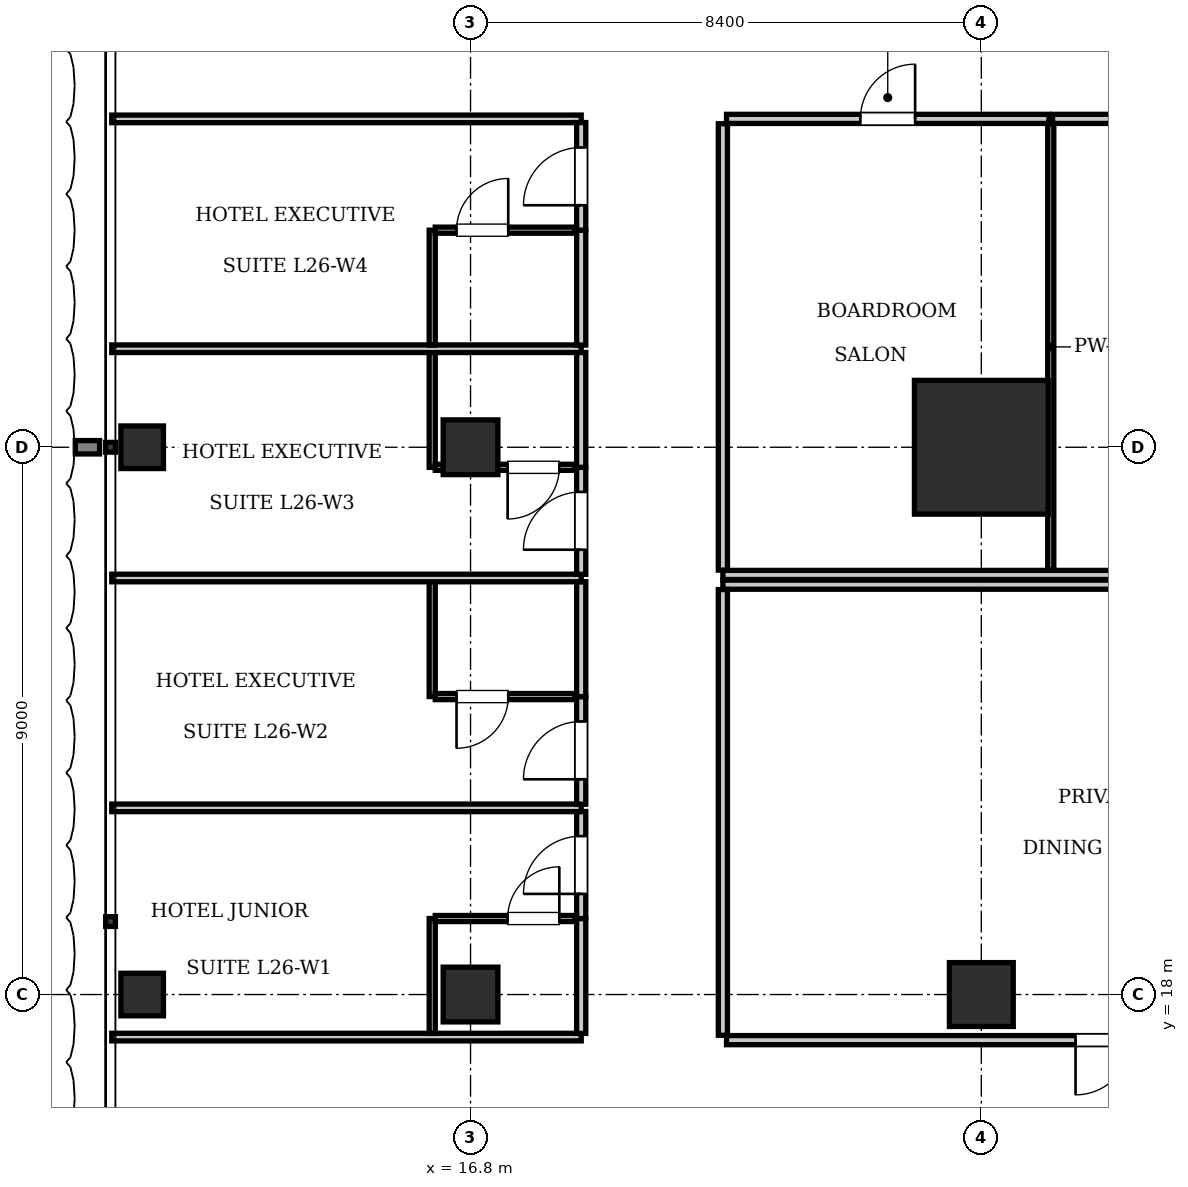
"""IFC4 building model, lengths in metres.
Left out: names, types, materials, properties, quantities, classifications, styles, units other than length and angle.
Written with IfcOpenShell. Run it as: python <this file> out.ifc"""

import sys

from ifc_helpers import new_model, si_unit, direction, frame, frame_2d, origin, origin_2d, place, context, subcontext, project, spatial, rectangle, i_section, extrude, element, fill, save


model = new_model("IFC4")
c1 = context("Model", 3, precision=1e-05, world=origin(), true_north=direction((0.0, 1.0)))
c2 = subcontext(c1, "Body", "Model", "MODEL_VIEW")
j1 = project(units=[si_unit("LENGTHUNIT", "METRE"), si_unit("PLANEANGLEUNIT", "RADIAN")], contexts=[c1])
p1 = place(None, origin())
s1 = spatial("IfcSite", under=j1, at=p1, CompositionType="ELEMENT")
p2 = place(p1, origin())
s2 = spatial("IfcBuilding", under=s1, at=p2, CompositionType="ELEMENT")
p3 = place(p2, frame((0.0, 0.0, 107.8)))
s3 = spatial("IfcBuildingStorey", under=s2, at=p3, CompositionType="ELEMENT", Elevation=107.8)
p4 = place(p3, frame((25.2, 27.0, 0.0), z_axis=(0.0, 0.0, 1.0), x_axis=(1.0, 0.0, 0.0)))
e1 = element("IfcColumn", 1, at=p4, inside=s3, PredefinedType="COLUMN", context=c2, shape_type="SweptSolid", body=[
    extrude(rectangle(XDim=2.2, YDim=2.2, at=origin_2d()), origin(), (0.0, 0.0, 1.0), 3.85),
])
p5 = place(p3, frame((25.2, 18.0, 0.0), z_axis=(0.0, 0.0, 1.0), x_axis=(1.0, 0.0, 0.0)))
e2 = element("IfcColumn", 2, at=p5, inside=s3, PredefinedType="COLUMN", context=c2, shape_type="SweptSolid", body=[
    extrude(rectangle(XDim=1.05, YDim=1.05, at=origin_2d()), origin(), (0.0, 0.0, 1.0), 3.85),
])
for number, where, z_axis, x_axis in (
    (3, (16.8, 18.0, 0.0), (0.0, 0.0, 1.0), (1.0, 0.0, 0.0)),
    (4, (16.8, 27.0, 0.0), (0.0, 0.0, 1.0), (1.0, 0.0, 0.0)),
):
    element("IfcColumn", number, at=place(p3, frame(where, z_axis=z_axis, x_axis=x_axis)), inside=s3, PredefinedType="COLUMN", context=c2, shape_type="SweptSolid", body=[
        extrude(rectangle(XDim=0.9, YDim=0.9, at=origin_2d()), origin(), (0.0, 0.0, 1.0), 3.85),
    ])
for number, where, z_axis, x_axis in (
    (5, (11.4, 18.0, 0.0), (0.0, 0.0, 1.0), (1.0, 0.0, 0.0)),
    (6, (11.4, 27.0, 0.0), (0.0, 0.0, 1.0), (1.0, 0.0, 0.0)),
):
    element("IfcColumn", number, at=place(p3, frame(where, z_axis=z_axis, x_axis=x_axis)), inside=s3, PredefinedType="COLUMN", context=c2, shape_type="SweptSolid", body=[
        extrude(i_section(OverallWidth=0.7, OverallDepth=0.7, WebThickness=0.028, FlangeThickness=0.044, at=origin_2d()), origin(), (0.0, 0.0, 1.0), 3.85),
    ])
p6 = place(p3, frame((20.95, 24.9, 0.0), z_axis=(0.0, 0.0, 1.0), x_axis=(1.0, 0.0, 0.0)))
e7 = element("IfcWall", 7, at=p6, inside=s3, PredefinedType="PARTITIONING", context=c2, shape_type="SweptSolid", body=[
    extrude(rectangle(XDim=33.7, YDim=0.15, at=frame_2d((16.85, 0.0))), origin(), (0.0, 0.0, 1.0), 3.61),
])
p7 = place(p3, frame((20.95, 24.98, 0.0), z_axis=(0.0, 0.0, 1.0), x_axis=(0.0, 1.0, 0.0)))
e8 = element("IfcWall", 8, at=p7, inside=s3, PredefinedType="PARTITIONING", context=c2, shape_type="SweptSolid", body=[
    extrude(rectangle(XDim=7.34, YDim=0.15, at=frame_2d((3.67, 0.0))), origin(), (0.0, 0.0, 1.0), 3.293),
])
p8 = place(p3, frame((21.01, 32.4, 0.0), z_axis=(0.0, 0.0, 1.0), x_axis=(1.0, 0.0, 0.0)))
e9 = element("IfcWall", 9, at=p8, inside=s3, PredefinedType="PARTITIONING", context=c2, shape_type="SweptSolid", body=[
    extrude(rectangle(XDim=5.302, YDim=0.15, at=frame_2d((2.651, 0.0))), origin(), (0.0, 0.0, 1.0), 3.61),
])
p9 = place(p8, frame((2.201, 0.0, 0.0)))
e10 = element("IfcOpeningElement", 10, at=p9, cuts=e9, PredefinedType="OPENING", context=c2, shape_type="SweptSolid", body=[
    extrude(rectangle(XDim=0.9, YDim=2.1, at=frame_2d((0.45, 1.05))), frame((0.0, 0.085, 0.0), z_axis=(0.0, -1.0, 0.0), x_axis=(1.0, 0.0, 0.0)), (0.0, 0.0, 1.0), 0.17),
])
p10 = place(p3, frame((26.342, 24.98, 0.0), z_axis=(0.0, 0.0, 1.0), x_axis=(0.0, 1.0, 0.0)))
e11 = element("IfcWall", 11, at=p10, inside=s3, PredefinedType="PARTITIONING", context=c2, shape_type="SweptSolid", body=[
    extrude(rectangle(XDim=7.34, YDim=0.1, at=frame_2d((3.67, 0.0))), origin(), (0.0, 0.0, 1.0), 3.61),
])
p11 = place(p3, frame((26.372, 32.4, 0.0), z_axis=(0.0, 0.0, 1.0), x_axis=(1.0, 0.0, 0.0)))
e12 = element("IfcWall", 12, at=p11, inside=s3, PredefinedType="PARTITIONING", context=c2, shape_type="SweptSolid", body=[
    extrude(rectangle(XDim=7.354, YDim=0.15, at=frame_2d((3.677, 0.0))), origin(), (0.0, 0.0, 1.0), 3.61),
])
p12 = place(p11, frame((3.227, 0.0, 0.0)))
e13 = element("IfcOpeningElement", 13, at=p12, cuts=e12, PredefinedType="OPENING", context=c2, shape_type="SweptSolid", body=[
    extrude(rectangle(XDim=0.9, YDim=2.1, at=frame_2d((0.45, 1.05))), frame((0.0, 0.085, 0.0), z_axis=(0.0, -1.0, 0.0), x_axis=(1.0, 0.0, 0.0)), (0.0, 0.0, 1.0), 0.17),
])
p13 = place(p3, frame((20.95, 24.74, 0.0), z_axis=(0.0, 0.0, 1.0), x_axis=(1.0, 0.0, 0.0)))
e14 = element("IfcWall", 14, at=p13, inside=s3, PredefinedType="PARTITIONING", context=c2, shape_type="SweptSolid", body=[
    extrude(rectangle(XDim=33.7, YDim=0.15, at=frame_2d((16.85, 0.0))), origin(), (0.0, 0.0, 1.0), 3.61),
])
p14 = place(p3, frame((20.95, 17.33, 0.0), z_axis=(0.0, 0.0, 1.0), x_axis=(0.0, 1.0, 0.0)))
e15 = element("IfcWall", 15, at=p14, inside=s3, PredefinedType="PARTITIONING", context=c2, shape_type="SweptSolid", body=[
    extrude(rectangle(XDim=7.33, YDim=0.15, at=frame_2d((3.665, 0.0))), origin(), (0.0, 0.0, 1.0), 3.293),
])
p15 = place(p3, frame((21.01, 17.25, 0.0), z_axis=(0.0, 0.0, 1.0), x_axis=(1.0, 0.0, 0.0)))
e16 = element("IfcWall", 16, at=p15, inside=s3, PredefinedType="PARTITIONING", context=c2, shape_type="SweptSolid", body=[
    extrude(rectangle(XDim=12.379, YDim=0.15, at=frame_2d((6.189, 0.0))), origin(), (0.0, 0.0, 1.0), 3.61),
])
p16 = place(p15, frame((5.74, 0.0, 0.0)))
e17 = element("IfcOpeningElement", 17, at=p16, cuts=e16, PredefinedType="OPENING", context=c2, shape_type="SweptSolid", body=[
    extrude(rectangle(XDim=0.9, YDim=2.1, at=frame_2d((0.45, 1.05))), frame((0.0, 0.085, 0.0), z_axis=(0.0, -1.0, 0.0), x_axis=(1.0, 0.0, 0.0)), (0.0, 0.0, 1.0), 0.17),
])
for number, where, z_axis, x_axis in (
    (18, (10.9, 17.3, 0.0), (0.0, 0.0, 1.0), (1.0, 0.0, 0.0)),
    (19, (10.9, 32.4, 0.0), (0.0, 0.0, 1.0), (1.0, 0.0, 0.0)),
):
    element("IfcWall", number, at=place(p3, frame(where, z_axis=z_axis, x_axis=x_axis)), inside=s3, PredefinedType="PARTITIONING", context=c2, shape_type="SweptSolid", body=[
        extrude(rectangle(XDim=7.72, YDim=0.125, at=frame_2d((3.86, 0.0))), origin(), (0.0, 0.0, 1.0), 3.61),
    ])
p17 = place(p3, frame((18.62, 17.36, 0.0), z_axis=(0.0, 0.0, 1.0), x_axis=(0.0, 1.0, 0.0)))
e20 = element("IfcWall", 20, at=p17, inside=s3, PredefinedType="PARTITIONING", context=c2, shape_type="SweptSolid", body=[
    extrude(rectangle(XDim=1.89, YDim=0.15, at=frame_2d((0.945, 0.0))), origin(), (0.0, 0.0, 1.0), 3.61),
])
p18 = place(p3, frame((18.62, 19.25, 0.0), z_axis=(0.0, 0.0, 1.0), x_axis=(0.0, 1.0, 0.0)))
e21 = element("IfcWall", 21, at=p18, inside=s3, PredefinedType="PARTITIONING", context=c2, shape_type="SweptSolid", body=[
    extrude(rectangle(XDim=1.76, YDim=0.15, at=frame_2d((0.88, 0.0))), origin(), (0.0, 0.0, 1.0), 3.61),
])
p19 = place(p18, frame((0.405, 0.0, 0.0)))
e22 = element("IfcOpeningElement", 22, at=p19, cuts=e21, PredefinedType="OPENING", context=c2, shape_type="SweptSolid", body=[
    extrude(rectangle(XDim=0.95, YDim=2.15, at=frame_2d((0.475, 1.075))), frame((0.0, 0.085, 0.0), z_axis=(0.0, -1.0, 0.0), x_axis=(1.0, 0.0, 0.0)), (0.0, 0.0, 1.0), 0.17),
])
p20 = place(p3, frame((16.17, 17.36, 0.0), z_axis=(0.0, 0.0, 1.0), x_axis=(0.0, 1.0, 0.0)))
e23 = element("IfcWall", 23, at=p20, inside=s3, PredefinedType="PARTITIONING", context=c2, shape_type="SweptSolid", body=[
    extrude(rectangle(XDim=1.89, YDim=0.1, at=frame_2d((0.945, 0.0))), origin(), (0.0, 0.0, 1.0), 3.61),
])
p21 = place(p3, frame((16.22, 19.25, 0.0), z_axis=(0.0, 0.0, 1.0), x_axis=(1.0, 0.0, 0.0)))
e24 = element("IfcWall", 24, at=p21, inside=s3, PredefinedType="PARTITIONING", context=c2, shape_type="SweptSolid", body=[
    extrude(rectangle(XDim=2.3, YDim=0.1, at=frame_2d((1.15, 0.0))), origin(), (0.0, 0.0, 1.0), 3.61),
])
p22 = place(p21, frame((1.19, 0.0, 0.0)))
e25 = element("IfcOpeningElement", 25, at=p22, cuts=e24, PredefinedType="OPENING", context=c2, shape_type="SweptSolid", body=[
    extrude(rectangle(XDim=0.85, YDim=2.1, at=frame_2d((0.425, 1.05))), frame((0.0, 0.06, 0.0), z_axis=(0.0, -1.0, 0.0), x_axis=(1.0, 0.0, 0.0)), (0.0, 0.0, 1.0), 0.12),
])
p23 = place(p3, frame((10.9, 21.07, 0.0), z_axis=(0.0, 0.0, 1.0), x_axis=(1.0, 0.0, 0.0)))
e26 = element("IfcWall", 26, at=p23, inside=s3, PredefinedType="PARTITIONING", context=c2, shape_type="SweptSolid", body=[
    extrude(rectangle(XDim=7.72, YDim=0.125, at=frame_2d((3.86, 0.0))), origin(), (0.0, 0.0, 1.0), 3.61),
])
p24 = place(p3, frame((18.62, 21.13, 0.0), z_axis=(0.0, 0.0, 1.0), x_axis=(0.0, 1.0, 0.0)))
e27 = element("IfcWall", 27, at=p24, inside=s3, PredefinedType="PARTITIONING", context=c2, shape_type="SweptSolid", body=[
    extrude(rectangle(XDim=1.77, YDim=0.15, at=frame_2d((0.885, 0.0))), origin(), (0.0, 0.0, 1.0), 3.61),
])
p25 = place(p24, frame((0.41, 0.0, 0.0)))
e28 = element("IfcOpeningElement", 28, at=p25, cuts=e27, PredefinedType="OPENING", context=c2, shape_type="SweptSolid", body=[
    extrude(rectangle(XDim=0.95, YDim=2.15, at=frame_2d((0.475, 1.075))), frame((0.0, 0.085, 0.0), z_axis=(0.0, -1.0, 0.0), x_axis=(1.0, 0.0, 0.0)), (0.0, 0.0, 1.0), 0.17),
])
p26 = place(p3, frame((18.62, 22.9, 0.0), z_axis=(0.0, 0.0, 1.0), x_axis=(0.0, 1.0, 0.0)))
e29 = element("IfcWall", 29, at=p26, inside=s3, PredefinedType="PARTITIONING", context=c2, shape_type="SweptSolid", body=[
    extrude(rectangle(XDim=1.89, YDim=0.15, at=frame_2d((0.945, 0.0))), origin(), (0.0, 0.0, 1.0), 3.61),
])
p27 = place(p3, frame((16.17, 22.9, 0.0), z_axis=(0.0, 0.0, 1.0), x_axis=(0.0, 1.0, 0.0)))
e30 = element("IfcWall", 30, at=p27, inside=s3, PredefinedType="PARTITIONING", context=c2, shape_type="SweptSolid", body=[
    extrude(rectangle(XDim=1.89, YDim=0.1, at=frame_2d((0.945, 0.0))), origin(), (0.0, 0.0, 1.0), 3.61),
])
p28 = place(p3, frame((16.22, 22.9, 0.0), z_axis=(0.0, 0.0, 1.0), x_axis=(1.0, 0.0, 0.0)))
e31 = element("IfcWall", 31, at=p28, inside=s3, PredefinedType="PARTITIONING", context=c2, shape_type="SweptSolid", body=[
    extrude(rectangle(XDim=2.3, YDim=0.1, at=frame_2d((1.15, 0.0))), origin(), (0.0, 0.0, 1.0), 3.61),
])
p29 = place(p28, frame((0.35, 0.0, 0.0)))
e32 = element("IfcOpeningElement", 32, at=p29, cuts=e31, PredefinedType="OPENING", context=c2, shape_type="SweptSolid", body=[
    extrude(rectangle(XDim=0.85, YDim=2.1, at=frame_2d((0.425, 1.05))), frame((0.0, 0.06, 0.0), z_axis=(0.0, -1.0, 0.0), x_axis=(1.0, 0.0, 0.0)), (0.0, 0.0, 1.0), 0.12),
])
p30 = place(p3, frame((10.9, 24.85, 0.0), z_axis=(0.0, 0.0, 1.0), x_axis=(1.0, 0.0, 0.0)))
e33 = element("IfcWall", 33, at=p30, inside=s3, PredefinedType="PARTITIONING", context=c2, shape_type="SweptSolid", body=[
    extrude(rectangle(XDim=7.72, YDim=0.125, at=frame_2d((3.86, 0.0))), origin(), (0.0, 0.0, 1.0), 3.61),
])
p31 = place(p3, frame((18.62, 24.91, 0.0), z_axis=(0.0, 0.0, 1.0), x_axis=(0.0, 1.0, 0.0)))
e34 = element("IfcWall", 34, at=p31, inside=s3, PredefinedType="PARTITIONING", context=c2, shape_type="SweptSolid", body=[
    extrude(rectangle(XDim=1.76, YDim=0.15, at=frame_2d((0.88, 0.0))), origin(), (0.0, 0.0, 1.0), 3.61),
])
p32 = place(p31, frame((0.405, 0.0, 0.0)))
e35 = element("IfcOpeningElement", 35, at=p32, cuts=e34, PredefinedType="OPENING", context=c2, shape_type="SweptSolid", body=[
    extrude(rectangle(XDim=0.95, YDim=2.15, at=frame_2d((0.475, 1.075))), frame((0.0, 0.085, 0.0), z_axis=(0.0, -1.0, 0.0), x_axis=(1.0, 0.0, 0.0)), (0.0, 0.0, 1.0), 0.17),
])
p33 = place(p3, frame((18.62, 26.67, 0.0), z_axis=(0.0, 0.0, 1.0), x_axis=(0.0, 1.0, 0.0)))
e36 = element("IfcWall", 36, at=p33, inside=s3, PredefinedType="PARTITIONING", context=c2, shape_type="SweptSolid", body=[
    extrude(rectangle(XDim=1.89, YDim=0.15, at=frame_2d((0.945, 0.0))), origin(), (0.0, 0.0, 1.0), 3.61),
])
p34 = place(p3, frame((16.17, 26.67, 0.0), z_axis=(0.0, 0.0, 1.0), x_axis=(0.0, 1.0, 0.0)))
e37 = element("IfcWall", 37, at=p34, inside=s3, PredefinedType="PARTITIONING", context=c2, shape_type="SweptSolid", body=[
    extrude(rectangle(XDim=1.89, YDim=0.1, at=frame_2d((0.945, 0.0))), origin(), (0.0, 0.0, 1.0), 3.61),
])
p35 = place(p3, frame((16.22, 26.67, 0.0), z_axis=(0.0, 0.0, 1.0), x_axis=(1.0, 0.0, 0.0)))
e38 = element("IfcWall", 38, at=p35, inside=s3, PredefinedType="PARTITIONING", context=c2, shape_type="SweptSolid", body=[
    extrude(rectangle(XDim=2.3, YDim=0.1, at=frame_2d((1.15, 0.0))), origin(), (0.0, 0.0, 1.0), 3.61),
])
p36 = place(p35, frame((1.19, 0.0, 0.0)))
e39 = element("IfcOpeningElement", 39, at=p36, cuts=e38, PredefinedType="OPENING", context=c2, shape_type="SweptSolid", body=[
    extrude(rectangle(XDim=0.85, YDim=2.1, at=frame_2d((0.425, 1.05))), frame((0.0, 0.06, 0.0), z_axis=(0.0, -1.0, 0.0), x_axis=(1.0, 0.0, 0.0)), (0.0, 0.0, 1.0), 0.12),
])
p37 = place(p3, frame((10.9, 28.62, 0.0), z_axis=(0.0, 0.0, 1.0), x_axis=(1.0, 0.0, 0.0)))
e40 = element("IfcWall", 40, at=p37, inside=s3, PredefinedType="PARTITIONING", context=c2, shape_type="SweptSolid", body=[
    extrude(rectangle(XDim=7.72, YDim=0.125, at=frame_2d((3.86, 0.0))), origin(), (0.0, 0.0, 1.0), 3.61),
])
p38 = place(p3, frame((18.62, 28.68, 0.0), z_axis=(0.0, 0.0, 1.0), x_axis=(0.0, 1.0, 0.0)))
e41 = element("IfcWall", 41, at=p38, inside=s3, PredefinedType="PARTITIONING", context=c2, shape_type="SweptSolid", body=[
    extrude(rectangle(XDim=1.89, YDim=0.15, at=frame_2d((0.945, 0.0))), origin(), (0.0, 0.0, 1.0), 3.61),
])
p39 = place(p3, frame((18.62, 30.57, 0.0), z_axis=(0.0, 0.0, 1.0), x_axis=(0.0, 1.0, 0.0)))
e42 = element("IfcWall", 42, at=p39, inside=s3, PredefinedType="PARTITIONING", context=c2, shape_type="SweptSolid", body=[
    extrude(rectangle(XDim=1.77, YDim=0.15, at=frame_2d((0.885, 0.0))), origin(), (0.0, 0.0, 1.0), 3.61),
])
p40 = place(p39, frame((0.41, 0.0, 0.0)))
e43 = element("IfcOpeningElement", 43, at=p40, cuts=e42, PredefinedType="OPENING", context=c2, shape_type="SweptSolid", body=[
    extrude(rectangle(XDim=0.95, YDim=2.15, at=frame_2d((0.475, 1.075))), frame((0.0, 0.085, 0.0), z_axis=(0.0, -1.0, 0.0), x_axis=(1.0, 0.0, 0.0)), (0.0, 0.0, 1.0), 0.17),
])
p41 = place(p3, frame((16.17, 28.68, 0.0), z_axis=(0.0, 0.0, 1.0), x_axis=(0.0, 1.0, 0.0)))
e44 = element("IfcWall", 44, at=p41, inside=s3, PredefinedType="PARTITIONING", context=c2, shape_type="SweptSolid", body=[
    extrude(rectangle(XDim=1.89, YDim=0.1, at=frame_2d((0.945, 0.0))), origin(), (0.0, 0.0, 1.0), 3.61),
])
p42 = place(p3, frame((16.22, 30.57, 0.0), z_axis=(0.0, 0.0, 1.0), x_axis=(1.0, 0.0, 0.0)))
e45 = element("IfcWall", 45, at=p42, inside=s3, PredefinedType="PARTITIONING", context=c2, shape_type="SweptSolid", body=[
    extrude(rectangle(XDim=2.3, YDim=0.1, at=frame_2d((1.15, 0.0))), origin(), (0.0, 0.0, 1.0), 3.61),
])
p43 = place(p42, frame((0.35, 0.0, 0.0)))
e46 = element("IfcOpeningElement", 46, at=p43, cuts=e45, PredefinedType="OPENING", context=c2, shape_type="SweptSolid", body=[
    extrude(rectangle(XDim=0.85, YDim=2.1, at=frame_2d((0.425, 1.05))), frame((0.0, 0.06, 0.0), z_axis=(0.0, -1.0, 0.0), x_axis=(1.0, 0.0, 0.0)), (0.0, 0.0, 1.0), 0.12),
])
p44 = place(p9, origin())
e47 = element("IfcDoor", 47, at=p44, inside=s3, OperationType="SINGLE_SWING_RIGHT", PredefinedType="DOOR", context=c2, shape_type="SweptSolid", body=[
    extrude(rectangle(XDim=0.9, YDim=2.1, at=frame_2d((0.45, 1.05))), frame((0.0, 0.025, 0.0), z_axis=(0.0, -1.0, 0.0), x_axis=(1.0, 0.0, 0.0)), (0.0, 0.0, 1.0), 0.05),
])
fill(e10, e47)
p45 = place(p16, frame((0.9, 0.0, 0.0), z_axis=(0.0, 0.0, 1.0), x_axis=(-1.0, 0.0, 0.0)))
e48 = element("IfcDoor", 48, at=p45, inside=s3, OperationType="SINGLE_SWING_RIGHT", PredefinedType="DOOR", context=c2, shape_type="SweptSolid", body=[
    extrude(rectangle(XDim=0.9, YDim=2.1, at=frame_2d((0.45, 1.05))), frame((0.0, 0.025, 0.0), z_axis=(0.0, -1.0, 0.0), x_axis=(1.0, 0.0, 0.0)), (0.0, 0.0, 1.0), 0.05),
])
fill(e17, e48)
p46 = place(p22, origin())
e49 = element("IfcDoor", 49, at=p46, inside=s3, OperationType="SINGLE_SWING_RIGHT", PredefinedType="DOOR", context=c2, shape_type="SweptSolid", body=[
    extrude(rectangle(XDim=0.85, YDim=2.1, at=frame_2d((0.425, 1.05))), frame((0.0, 0.025, 0.0), z_axis=(0.0, -1.0, 0.0), x_axis=(1.0, 0.0, 0.0)), (0.0, 0.0, 1.0), 0.05),
])
fill(e25, e49)
p47 = place(p19, origin())
e50 = element("IfcDoor", 50, at=p47, inside=s3, OperationType="SINGLE_SWING_LEFT", PredefinedType="DOOR", context=c2, shape_type="SweptSolid", body=[
    extrude(rectangle(XDim=0.95, YDim=2.15, at=frame_2d((0.475, 1.075))), frame((0.0, 0.025, 0.0), z_axis=(0.0, -1.0, 0.0), x_axis=(1.0, 0.0, 0.0)), (0.0, 0.0, 1.0), 0.05),
])
fill(e22, e50)
p48 = place(p29, frame((0.85, 0.0, 0.0), z_axis=(0.0, 0.0, 1.0), x_axis=(-1.0, 0.0, 0.0)))
e51 = element("IfcDoor", 51, at=p48, inside=s3, OperationType="SINGLE_SWING_RIGHT", PredefinedType="DOOR", context=c2, shape_type="SweptSolid", body=[
    extrude(rectangle(XDim=0.85, YDim=2.1, at=frame_2d((0.425, 1.05))), frame((0.0, 0.025, 0.0), z_axis=(0.0, -1.0, 0.0), x_axis=(1.0, 0.0, 0.0)), (0.0, 0.0, 1.0), 0.05),
])
fill(e32, e51)
p49 = place(p25, origin())
e52 = element("IfcDoor", 52, at=p49, inside=s3, OperationType="SINGLE_SWING_LEFT", PredefinedType="DOOR", context=c2, shape_type="SweptSolid", body=[
    extrude(rectangle(XDim=0.95, YDim=2.15, at=frame_2d((0.475, 1.075))), frame((0.0, 0.025, 0.0), z_axis=(0.0, -1.0, 0.0), x_axis=(1.0, 0.0, 0.0)), (0.0, 0.0, 1.0), 0.05),
])
fill(e28, e52)
p50 = place(p36, frame((0.85, 0.0, 0.0), z_axis=(0.0, 0.0, 1.0), x_axis=(-1.0, 0.0, 0.0)))
e53 = element("IfcDoor", 53, at=p50, inside=s3, OperationType="SINGLE_SWING_RIGHT", PredefinedType="DOOR", context=c2, shape_type="SweptSolid", body=[
    extrude(rectangle(XDim=0.85, YDim=2.1, at=frame_2d((0.425, 1.05))), frame((0.0, 0.025, 0.0), z_axis=(0.0, -1.0, 0.0), x_axis=(1.0, 0.0, 0.0)), (0.0, 0.0, 1.0), 0.05),
])
fill(e39, e53)
p51 = place(p32, origin())
e54 = element("IfcDoor", 54, at=p51, inside=s3, OperationType="SINGLE_SWING_LEFT", PredefinedType="DOOR", context=c2, shape_type="SweptSolid", body=[
    extrude(rectangle(XDim=0.95, YDim=2.15, at=frame_2d((0.475, 1.075))), frame((0.0, 0.025, 0.0), z_axis=(0.0, -1.0, 0.0), x_axis=(1.0, 0.0, 0.0)), (0.0, 0.0, 1.0), 0.05),
])
fill(e35, e54)
p52 = place(p43, origin())
e55 = element("IfcDoor", 55, at=p52, inside=s3, OperationType="SINGLE_SWING_RIGHT", PredefinedType="DOOR", context=c2, shape_type="SweptSolid", body=[
    extrude(rectangle(XDim=0.85, YDim=2.1, at=frame_2d((0.425, 1.05))), frame((0.0, 0.025, 0.0), z_axis=(0.0, -1.0, 0.0), x_axis=(1.0, 0.0, 0.0)), (0.0, 0.0, 1.0), 0.05),
])
fill(e46, e55)
p53 = place(p40, origin())
e56 = element("IfcDoor", 56, at=p53, inside=s3, OperationType="SINGLE_SWING_LEFT", PredefinedType="DOOR", context=c2, shape_type="SweptSolid", body=[
    extrude(rectangle(XDim=0.95, YDim=2.15, at=frame_2d((0.475, 1.075))), frame((0.0, 0.025, 0.0), z_axis=(0.0, -1.0, 0.0), x_axis=(1.0, 0.0, 0.0)), (0.0, 0.0, 1.0), 0.05),
])
fill(e43, e56)
save(model, sys.argv[1])
